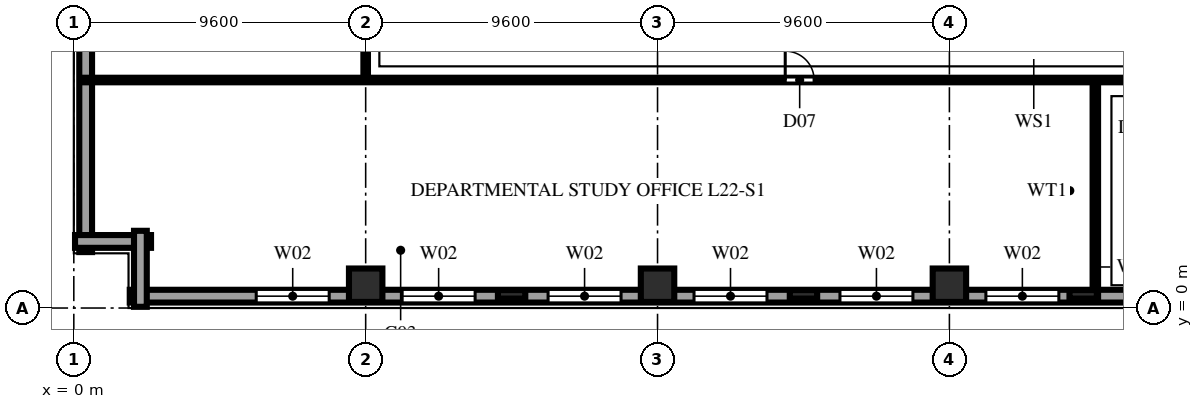
"""IFC4 building model, lengths in metres.
Left out: names, types, materials, properties, quantities, classifications, styles, units other than length and angle.
Written with IfcOpenShell. Run it as: python <this file> out.ifc"""

import sys

from ifc_helpers import new_model, si_unit, direction, frame, frame_2d, origin, origin_2d, place, context, subcontext, project, spatial, rectangle, extrude, element, fill, save


model = new_model("IFC4")
c1 = context("Model", 3, precision=1e-05, world=origin(), true_north=direction((0.0, 1.0)))
c2 = subcontext(c1, "Body", "Model", "MODEL_VIEW")
j1 = project(units=[si_unit("LENGTHUNIT", "METRE"), si_unit("PLANEANGLEUNIT", "RADIAN")], contexts=[c1])
p1 = place(None, origin())
s1 = spatial("IfcSite", under=j1, at=p1, CompositionType="ELEMENT")
p2 = place(p1, origin())
s2 = spatial("IfcBuilding", under=s1, at=p2, CompositionType="ELEMENT")
p3 = place(p2, frame((0.0, 0.0, 88.8)))
s3 = spatial("IfcBuildingStorey", under=s2, at=p3, CompositionType="ELEMENT", Elevation=88.8)
for number, where, z_axis, x_axis in (
    (1, (9.6, 0.75, 0.0), (0.0, 0.0, 1.0), (1.0, 0.0, 0.0)),
    (2, (19.2, 0.75, 0.0), (0.0, 0.0, 1.0), (1.0, 0.0, 0.0)),
    (3, (28.8, 0.75, 0.0), (0.0, 0.0, 1.0), (1.0, 0.0, 0.0)),
):
    element("IfcColumn", number, at=place(p3, frame(where, z_axis=z_axis, x_axis=x_axis)), inside=s3, PredefinedType="COLUMN", context=c2, shape_type="SweptSolid", body=[
        extrude(rectangle(XDim=1.1, YDim=1.1, at=origin_2d()), origin(), (0.0, 0.0, 1.0), 3.8),
    ])
for number, where, z_axis, x_axis in (
    (4, (14.4, 0.45, 0.0), (0.0, 0.0, 1.0), (1.0, 0.0, 0.0)),
    (5, (24.0, 0.45, 0.0), (0.0, 0.0, 1.0), (1.0, 0.0, 0.0)),
    (6, (33.2, 0.45, 0.0), (0.0, 0.0, 1.0), (1.0, 0.0, 0.0)),
):
    element("IfcColumn", number, at=place(p3, frame(where, z_axis=z_axis, x_axis=x_axis)), inside=s3, PredefinedType="PILASTER", context=c2, shape_type="SweptSolid", body=[
        extrude(rectangle(XDim=0.9, YDim=0.28, at=origin_2d()), origin(), (0.0, 0.0, 1.0), 3.8),
    ])
p4 = place(p3, frame((1.84, 0.39, 0.0), z_axis=(0.0, 0.0, 1.0), x_axis=(1.0, 0.0, 0.0)))
e7 = element("IfcWall", 7, at=p4, inside=s3, PredefinedType="SOLIDWALL", context=c2, shape_type="SweptSolid", body=[
    extrude(rectangle(XDim=63.52, YDim=0.42, at=frame_2d((31.76, 0.0))), origin(), (0.0, 0.0, 1.0), 3.54),
])
p5 = place(p4, frame((4.16, 0.0, 0.85)))
e8 = element("IfcOpeningElement", 8, at=p5, cuts=e7, PredefinedType="OPENING", context=c2, shape_type="SweptSolid", body=[
    extrude(rectangle(XDim=2.4, YDim=1.85, at=frame_2d((1.2, 0.925))), frame((0.0, 0.222, 0.0), z_axis=(0.0, -1.0, 0.0), x_axis=(1.0, 0.0, 0.0)), (0.0, 0.0, 1.0), 0.444),
])
p6 = place(p4, frame((8.96, 0.0, 0.85)))
e9 = element("IfcOpeningElement", 9, at=p6, cuts=e7, PredefinedType="OPENING", context=c2, shape_type="SweptSolid", body=[
    extrude(rectangle(XDim=2.4, YDim=1.85, at=frame_2d((1.2, 0.925))), frame((0.0, 0.222, 0.0), z_axis=(0.0, -1.0, 0.0), x_axis=(1.0, 0.0, 0.0)), (0.0, 0.0, 1.0), 0.444),
])
p7 = place(p4, frame((13.76, 0.0, 0.85)))
e10 = element("IfcOpeningElement", 10, at=p7, cuts=e7, PredefinedType="OPENING", context=c2, shape_type="SweptSolid", body=[
    extrude(rectangle(XDim=2.4, YDim=1.85, at=frame_2d((1.2, 0.925))), frame((0.0, 0.222, 0.0), z_axis=(0.0, -1.0, 0.0), x_axis=(1.0, 0.0, 0.0)), (0.0, 0.0, 1.0), 0.444),
])
p8 = place(p4, frame((18.56, 0.0, 0.85)))
e11 = element("IfcOpeningElement", 11, at=p8, cuts=e7, PredefinedType="OPENING", context=c2, shape_type="SweptSolid", body=[
    extrude(rectangle(XDim=2.4, YDim=1.85, at=frame_2d((1.2, 0.925))), frame((0.0, 0.222, 0.0), z_axis=(0.0, -1.0, 0.0), x_axis=(1.0, 0.0, 0.0)), (0.0, 0.0, 1.0), 0.444),
])
p9 = place(p4, frame((23.36, 0.0, 0.85)))
e12 = element("IfcOpeningElement", 12, at=p9, cuts=e7, PredefinedType="OPENING", context=c2, shape_type="SweptSolid", body=[
    extrude(rectangle(XDim=2.4, YDim=1.85, at=frame_2d((1.2, 0.925))), frame((0.0, 0.222, 0.0), z_axis=(0.0, -1.0, 0.0), x_axis=(1.0, 0.0, 0.0)), (0.0, 0.0, 1.0), 0.444),
])
p10 = place(p4, frame((28.16, 0.0, 0.85)))
e13 = element("IfcOpeningElement", 13, at=p10, cuts=e7, PredefinedType="OPENING", context=c2, shape_type="SweptSolid", body=[
    extrude(rectangle(XDim=2.4, YDim=1.85, at=frame_2d((1.2, 0.925))), frame((0.0, 0.222, 0.0), z_axis=(0.0, -1.0, 0.0), x_axis=(1.0, 0.0, 0.0)), (0.0, 0.0, 1.0), 0.444),
])
p11 = place(p3, frame((0.39, 65.36, 0.0), z_axis=(0.0, 0.0, 1.0), x_axis=(0.0, -1.0, 0.0)))
e14 = element("IfcWall", 14, at=p11, inside=s3, PredefinedType="SOLIDWALL", context=c2, shape_type="SweptSolid", body=[
    extrude(rectangle(XDim=63.52, YDim=0.42, at=frame_2d((31.76, 0.0))), origin(), (0.0, 0.0, 1.0), 3.54),
])
p12 = place(p11, frame((4.885, 0.0, 0.9)))
e15 = element("IfcOpeningElement", 15, at=p12, cuts=e14, PredefinedType="OPENING", context=c2, shape_type="SweptSolid", body=[
    extrude(rectangle(XDim=0.95, YDim=1.85, at=frame_2d((0.475, 0.925))), frame((0.0, 0.222, 0.0), z_axis=(0.0, -1.0, 0.0), x_axis=(1.0, 0.0, 0.0)), (0.0, 0.0, 1.0), 0.444),
])
p13 = place(p11, frame((9.41, 0.0, 0.9)))
e16 = element("IfcOpeningElement", 16, at=p13, cuts=e14, PredefinedType="OPENING", context=c2, shape_type="SweptSolid", body=[
    extrude(rectangle(XDim=1.5, YDim=1.85, at=frame_2d((0.75, 0.925))), frame((0.0, 0.222, 0.0), z_axis=(0.0, -1.0, 0.0), x_axis=(1.0, 0.0, 0.0)), (0.0, 0.0, 1.0), 0.444),
])
p14 = place(p11, frame((14.485, 0.0, 0.9)))
e17 = element("IfcOpeningElement", 17, at=p14, cuts=e14, PredefinedType="OPENING", context=c2, shape_type="SweptSolid", body=[
    extrude(rectangle(XDim=0.95, YDim=1.85, at=frame_2d((0.475, 0.925))), frame((0.0, 0.222, 0.0), z_axis=(0.0, -1.0, 0.0), x_axis=(1.0, 0.0, 0.0)), (0.0, 0.0, 1.0), 0.444),
])
p15 = place(p11, frame((19.01, 0.0, 0.9)))
e18 = element("IfcOpeningElement", 18, at=p15, cuts=e14, PredefinedType="OPENING", context=c2, shape_type="SweptSolid", body=[
    extrude(rectangle(XDim=1.5, YDim=1.85, at=frame_2d((0.75, 0.925))), frame((0.0, 0.222, 0.0), z_axis=(0.0, -1.0, 0.0), x_axis=(1.0, 0.0, 0.0)), (0.0, 0.0, 1.0), 0.444),
])
p16 = place(p11, frame((24.085, 0.0, 0.9)))
e19 = element("IfcOpeningElement", 19, at=p16, cuts=e14, PredefinedType="OPENING", context=c2, shape_type="SweptSolid", body=[
    extrude(rectangle(XDim=0.95, YDim=1.85, at=frame_2d((0.475, 0.925))), frame((0.0, 0.222, 0.0), z_axis=(0.0, -1.0, 0.0), x_axis=(1.0, 0.0, 0.0)), (0.0, 0.0, 1.0), 0.444),
])
p17 = place(p11, frame((28.61, 0.0, 0.9)))
e20 = element("IfcOpeningElement", 20, at=p17, cuts=e14, PredefinedType="OPENING", context=c2, shape_type="SweptSolid", body=[
    extrude(rectangle(XDim=1.5, YDim=1.85, at=frame_2d((0.75, 0.925))), frame((0.0, 0.222, 0.0), z_axis=(0.0, -1.0, 0.0), x_axis=(1.0, 0.0, 0.0)), (0.0, 0.0, 1.0), 0.444),
])
p18 = place(p11, frame((33.685, 0.0, 0.9)))
e21 = element("IfcOpeningElement", 21, at=p18, cuts=e14, PredefinedType="OPENING", context=c2, shape_type="SweptSolid", body=[
    extrude(rectangle(XDim=0.95, YDim=1.85, at=frame_2d((0.475, 0.925))), frame((0.0, 0.222, 0.0), z_axis=(0.0, -1.0, 0.0), x_axis=(1.0, 0.0, 0.0)), (0.0, 0.0, 1.0), 0.444),
])
p19 = place(p11, frame((38.21, 0.0, 0.9)))
e22 = element("IfcOpeningElement", 22, at=p19, cuts=e14, PredefinedType="OPENING", context=c2, shape_type="SweptSolid", body=[
    extrude(rectangle(XDim=1.5, YDim=1.85, at=frame_2d((0.75, 0.925))), frame((0.0, 0.222, 0.0), z_axis=(0.0, -1.0, 0.0), x_axis=(1.0, 0.0, 0.0)), (0.0, 0.0, 1.0), 0.444),
])
p20 = place(p11, frame((43.285, 0.0, 0.9)))
e23 = element("IfcOpeningElement", 23, at=p20, cuts=e14, PredefinedType="OPENING", context=c2, shape_type="SweptSolid", body=[
    extrude(rectangle(XDim=0.95, YDim=1.85, at=frame_2d((0.475, 0.925))), frame((0.0, 0.222, 0.0), z_axis=(0.0, -1.0, 0.0), x_axis=(1.0, 0.0, 0.0)), (0.0, 0.0, 1.0), 0.444),
])
p21 = place(p11, frame((47.81, 0.0, 0.9)))
e24 = element("IfcOpeningElement", 24, at=p21, cuts=e14, PredefinedType="OPENING", context=c2, shape_type="SweptSolid", body=[
    extrude(rectangle(XDim=1.5, YDim=1.85, at=frame_2d((0.75, 0.925))), frame((0.0, 0.222, 0.0), z_axis=(0.0, -1.0, 0.0), x_axis=(1.0, 0.0, 0.0)), (0.0, 0.0, 1.0), 0.444),
])
p22 = place(p11, frame((52.885, 0.0, 0.9)))
e25 = element("IfcOpeningElement", 25, at=p22, cuts=e14, PredefinedType="OPENING", context=c2, shape_type="SweptSolid", body=[
    extrude(rectangle(XDim=0.95, YDim=1.85, at=frame_2d((0.475, 0.925))), frame((0.0, 0.222, 0.0), z_axis=(0.0, -1.0, 0.0), x_axis=(1.0, 0.0, 0.0)), (0.0, 0.0, 1.0), 0.444),
])
for number, where, z_axis, x_axis in (
    (26, (0.04, 2.19, 0.0), (0.0, 0.0, 1.0), (1.0, 0.0, 0.0)),
    (27, (2.19, 2.54, 0.0), (0.0, 0.0, 1.0), (0.0, -1.0, 0.0)),
):
    element("IfcWall", number, at=place(p3, frame(where, z_axis=z_axis, x_axis=x_axis)), inside=s3, PredefinedType="SOLIDWALL", context=c2, shape_type="SweptSolid", body=[
        extrude(rectangle(XDim=2.5, YDim=0.42, at=frame_2d((1.25, 0.0))), origin(), (0.0, 0.0, 1.0), 3.54),
    ])
p23 = place(p3, frame((9.6, 7.5, 0.0), z_axis=(0.0, 0.0, 1.0), x_axis=(0.0, 1.0, 0.0)))
e28 = element("IfcWall", 28, at=p23, inside=s3, PredefinedType="PARTITIONING", context=c2, shape_type="SweptSolid", body=[
    extrude(rectangle(XDim=2.1, YDim=0.15, at=frame_2d((1.05, 0.0))), origin(), (0.0, 0.0, 1.0), 2.924),
])
p24 = place(p3, frame((33.6, 0.22, 0.0), z_axis=(0.0, 0.0, 1.0), x_axis=(0.0, 1.0, 0.0)))
e29 = element("IfcWall", 29, at=p24, inside=s3, PredefinedType="PARTITIONING", context=c2, shape_type="SweptSolid", body=[
    extrude(rectangle(XDim=7.28, YDim=0.18, at=frame_2d((3.64, 0.0))), origin(), (0.0, 0.0, 1.0), 3.54),
])
p25 = place(p3, frame((0.22, 7.5, 0.0), z_axis=(0.0, 0.0, 1.0), x_axis=(1.0, 0.0, 0.0)))
e30 = element("IfcWall", 30, at=p25, inside=s3, PredefinedType="PARTITIONING", context=c2, shape_type="SweptSolid", body=[
    extrude(rectangle(XDim=62.18, YDim=0.15, at=frame_2d((31.09, 0.0))), origin(), (0.0, 0.0, 1.0), 3.54),
])
p26 = place(p25, frame((23.18, 0.0, 0.0)))
e31 = element("IfcOpeningElement", 31, at=p26, cuts=e30, PredefinedType="OPENING", context=c2, shape_type="SweptSolid", body=[
    extrude(rectangle(XDim=0.95, YDim=2.15, at=frame_2d((0.475, 1.075))), frame((0.0, 0.087, 0.0), z_axis=(0.0, -1.0, 0.0), x_axis=(1.0, 0.0, 0.0)), (0.0, 0.0, 1.0), 0.174),
])
p27 = place(p25, frame((51.43, 0.0, 0.0)))
e32 = element("IfcOpeningElement", 32, at=p27, cuts=e30, PredefinedType="OPENING", context=c2, shape_type="SweptSolid", body=[
    extrude(rectangle(XDim=0.95, YDim=2.15, at=frame_2d((0.475, 1.075))), frame((0.0, 0.087, 0.0), z_axis=(0.0, -1.0, 0.0), x_axis=(1.0, 0.0, 0.0)), (0.0, 0.0, 1.0), 0.174),
])
p28 = place(p5, origin())
e33 = element("IfcWindow", 33, at=p28, inside=s3, PartitioningType="TRIPLE_PANEL_VERTICAL", PredefinedType="WINDOW", context=c2, shape_type="SweptSolid", body=[
    extrude(rectangle(XDim=2.4, YDim=1.85, at=frame_2d((1.2, 0.925))), frame((0.0, 0.11, 0.0), z_axis=(0.0, -1.0, 0.0), x_axis=(1.0, 0.0, 0.0)), (0.0, 0.0, 1.0), 0.06),
])
fill(e8, e33)
p29 = place(p6, origin())
e34 = element("IfcWindow", 34, at=p29, inside=s3, PartitioningType="TRIPLE_PANEL_VERTICAL", PredefinedType="WINDOW", context=c2, shape_type="SweptSolid", body=[
    extrude(rectangle(XDim=2.4, YDim=1.85, at=frame_2d((1.2, 0.925))), frame((0.0, 0.11, 0.0), z_axis=(0.0, -1.0, 0.0), x_axis=(1.0, 0.0, 0.0)), (0.0, 0.0, 1.0), 0.06),
])
fill(e9, e34)
p30 = place(p7, origin())
e35 = element("IfcWindow", 35, at=p30, inside=s3, PartitioningType="TRIPLE_PANEL_VERTICAL", PredefinedType="WINDOW", context=c2, shape_type="SweptSolid", body=[
    extrude(rectangle(XDim=2.4, YDim=1.85, at=frame_2d((1.2, 0.925))), frame((0.0, 0.11, 0.0), z_axis=(0.0, -1.0, 0.0), x_axis=(1.0, 0.0, 0.0)), (0.0, 0.0, 1.0), 0.06),
])
fill(e10, e35)
p31 = place(p8, origin())
e36 = element("IfcWindow", 36, at=p31, inside=s3, PartitioningType="TRIPLE_PANEL_VERTICAL", PredefinedType="WINDOW", context=c2, shape_type="SweptSolid", body=[
    extrude(rectangle(XDim=2.4, YDim=1.85, at=frame_2d((1.2, 0.925))), frame((0.0, 0.11, 0.0), z_axis=(0.0, -1.0, 0.0), x_axis=(1.0, 0.0, 0.0)), (0.0, 0.0, 1.0), 0.06),
])
fill(e11, e36)
p32 = place(p9, origin())
e37 = element("IfcWindow", 37, at=p32, inside=s3, PartitioningType="TRIPLE_PANEL_VERTICAL", PredefinedType="WINDOW", context=c2, shape_type="SweptSolid", body=[
    extrude(rectangle(XDim=2.4, YDim=1.85, at=frame_2d((1.2, 0.925))), frame((0.0, 0.11, 0.0), z_axis=(0.0, -1.0, 0.0), x_axis=(1.0, 0.0, 0.0)), (0.0, 0.0, 1.0), 0.06),
])
fill(e12, e37)
p33 = place(p10, origin())
e38 = element("IfcWindow", 38, at=p33, inside=s3, PartitioningType="TRIPLE_PANEL_VERTICAL", PredefinedType="WINDOW", context=c2, shape_type="SweptSolid", body=[
    extrude(rectangle(XDim=2.4, YDim=1.85, at=frame_2d((1.2, 0.925))), frame((0.0, 0.11, 0.0), z_axis=(0.0, -1.0, 0.0), x_axis=(1.0, 0.0, 0.0)), (0.0, 0.0, 1.0), 0.06),
])
fill(e13, e38)
p34 = place(p26, origin())
e39 = element("IfcDoor", 39, at=p34, inside=s3, OperationType="SINGLE_SWING_LEFT", PredefinedType="DOOR", context=c2, shape_type="SweptSolid", body=[
    extrude(rectangle(XDim=0.95, YDim=2.15, at=frame_2d((0.475, 1.075))), frame((0.0, 0.025, 0.0), z_axis=(0.0, -1.0, 0.0), x_axis=(1.0, 0.0, 0.0)), (0.0, 0.0, 1.0), 0.05),
])
fill(e31, e39)
save(model, sys.argv[1])
